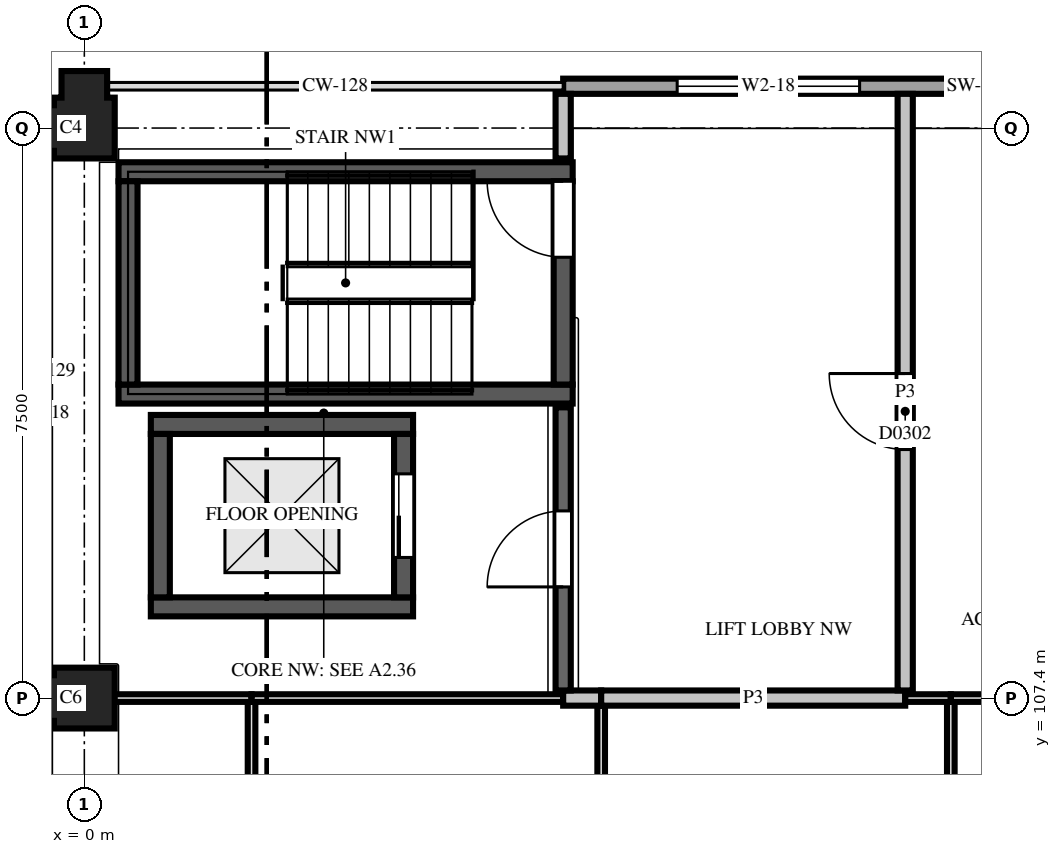
"""IFC4 building model, lengths in metres.
Left out: names, types, materials, properties, quantities, classifications, styles, units other than length and angle.
Written with IfcOpenShell. Run it as: python <this file> out.ifc"""

import sys

from ifc_helpers import new_model, si_unit, direction, frame, frame_2d, origin, place, context, subcontext, project, spatial, polyline, rectangle, outline, extrude, element, fill, save


model = new_model("IFC4")
c1 = context("Model", 3, precision=1e-05, world=origin(), true_north=direction((0.0, 1.0)))
c2 = subcontext(c1, "Body", "Model", "MODEL_VIEW")
j1 = project(units=[si_unit("LENGTHUNIT", "METRE"), si_unit("PLANEANGLEUNIT", "RADIAN")], contexts=[c1])
p1 = place(None, origin())
s1 = spatial("IfcSite", under=j1, at=p1, CompositionType="ELEMENT")
p2 = place(p1, origin())
s2 = spatial("IfcBuilding", under=s1, at=p2, CompositionType="ELEMENT")
p3 = place(p2, frame((0.0, 0.0, 11.9)))
s3 = spatial("IfcBuildingStorey", under=s2, at=p3, CompositionType="ELEMENT", Elevation=11.9)
p4 = place(p3, frame((0.0, 107.4, 0.0), z_axis=(0.0, 0.0, 1.0), x_axis=(-1.0, 0.0, 0.0)))
e1 = element("IfcColumn", 1, at=p4, inside=s3, PredefinedType="COLUMN", context=c2, shape_type="SweptSolid", body=[
    extrude(outline(polyline([(-0.4, -0.4), (0.4, -0.4), (0.4, -0.3), (0.75, -0.3), (0.75, 0.3), (0.4, 0.3), (0.4, 0.4), (-0.4, 0.4), (-0.4, -0.4)])), origin(), (0.0, 0.0, 1.0), 3.7),
])
p5 = place(p3, frame((0.0, 114.9, 0.0), z_axis=(0.0, 0.0, 1.0), x_axis=(0.0, 1.0, 0.0)))
e2 = element("IfcColumn", 2, at=p5, inside=s3, PredefinedType="COLUMN", context=c2, shape_type="SweptSolid", body=[
    extrude(outline(polyline([(-0.4, -0.4), (0.4, -0.4), (0.4, -0.3), (0.75, -0.3), (0.75, 0.3), (0.4, 0.3), (0.4, 0.4), (0.3, 0.4), (0.3, 0.75), (-0.3, 0.75), (-0.3, 0.4), (-0.4, 0.4), (-0.4, -0.4)])), origin(), (0.0, 0.0, 1.0), 3.7),
])
for number, where, z_axis, x_axis in (
    (3, (0.875, 108.6, 0.0), (0.0, 0.0, 1.0), (1.0, 0.0, 0.0)),
    (4, (0.875, 111.0, 0.0), (0.0, 0.0, 1.0), (1.0, 0.0, 0.0)),
):
    element("IfcWall", number, at=place(p3, frame(where, z_axis=z_axis, x_axis=x_axis)), inside=s3, PredefinedType="SHEAR", context=c2, shape_type="SweptSolid", body=[
        extrude(rectangle(XDim=3.45, YDim=0.25, at=frame_2d((1.725, 0.0))), origin(), (0.0, 0.0, 1.0), 3.7),
    ])
for number, where, z_axis, x_axis in (
    (5, (0.45, 111.4, 0.0), (0.0, 0.0, 1.0), (1.0, 0.0, 0.0)),
    (6, (0.45, 114.325, 0.0), (0.0, 0.0, 1.0), (1.0, 0.0, 0.0)),
):
    element("IfcWall", number, at=place(p3, frame(where, z_axis=z_axis, x_axis=x_axis)), inside=s3, PredefinedType="SHEAR", context=c2, shape_type="SweptSolid", body=[
        extrude(rectangle(XDim=5.975, YDim=0.25, at=frame_2d((2.988, 0.0))), origin(), (0.0, 0.0, 1.0), 3.7),
    ])
p6 = place(p3, frame((0.575, 111.525, 0.0), z_axis=(0.0, 0.0, 1.0), x_axis=(0.0, 1.0, 0.0)))
e7 = element("IfcWall", 7, at=p6, inside=s3, PredefinedType="SHEAR", context=c2, shape_type="SweptSolid", body=[
    extrude(rectangle(XDim=2.675, YDim=0.25, at=frame_2d((1.337, 0.0))), origin(), (0.0, 0.0, 1.0), 3.7),
])
p7 = place(p3, frame((1.0, 108.725, 0.0), z_axis=(0.0, 0.0, 1.0), x_axis=(0.0, 1.0, 0.0)))
e8 = element("IfcWall", 8, at=p7, inside=s3, PredefinedType="SHEAR", context=c2, shape_type="SweptSolid", body=[
    extrude(rectangle(XDim=2.15, YDim=0.25, at=frame_2d((1.075, 0.0))), origin(), (0.0, 0.0, 1.0), 3.7),
])
p8 = place(p3, frame((4.2, 108.725, 0.0), z_axis=(0.0, 0.0, 1.0), x_axis=(0.0, 1.0, 0.0)))
e9 = element("IfcWall", 9, at=p8, inside=s3, PredefinedType="SHEAR", context=c2, shape_type="SweptSolid", body=[
    extrude(rectangle(XDim=2.15, YDim=0.25, at=frame_2d((1.075, 0.0))), origin(), (0.0, 0.0, 1.0), 3.7),
])
p9 = place(p8, frame((0.525, 0.0, 0.0)))
e10 = element("IfcOpeningElement", 10, at=p9, cuts=e9, PredefinedType="OPENING", context=c2, shape_type="SweptSolid", body=[
    extrude(rectangle(XDim=1.1, YDim=2.1, at=frame_2d((0.55, 1.05))), frame((0.0, 0.135, 0.0), z_axis=(0.0, -1.0, 0.0), x_axis=(1.0, 0.0, 0.0)), (0.0, 0.0, 1.0), 0.27),
])
p10 = place(p3, frame((6.3, 111.525, 0.0), z_axis=(0.0, 0.0, 1.0), x_axis=(0.0, 1.0, 0.0)))
e11 = element("IfcWall", 11, at=p10, inside=s3, PredefinedType="SHEAR", context=c2, shape_type="SweptSolid", body=[
    extrude(rectangle(XDim=2.675, YDim=0.25, at=frame_2d((1.337, 0.0))), origin(), (0.0, 0.0, 1.0), 3.7),
])
p11 = place(p10, frame((1.675, 0.0, 0.0)))
e12 = element("IfcOpeningElement", 12, at=p11, cuts=e11, PredefinedType="OPENING", context=c2, shape_type="SweptSolid", body=[
    extrude(rectangle(XDim=1.0, YDim=2.1, at=frame_2d((0.5, 1.05))), frame((0.0, 0.135, 0.0), z_axis=(0.0, -1.0, 0.0), x_axis=(1.0, 0.0, 0.0)), (0.0, 0.0, 1.0), 0.27),
])
p12 = place(p3, frame((17.1, 115.45, 0.0), z_axis=(0.0, 0.0, 1.0), x_axis=(-1.0, 0.0, 0.0)))
e13 = element("IfcWall", 13, at=p12, inside=s3, PredefinedType="SOLIDWALL", context=c2, shape_type="SweptSolid", body=[
    extrude(rectangle(XDim=10.8, YDim=0.2, at=frame_2d((5.4, 0.0))), origin(), (0.0, 0.0, 1.0), 1.7),
])
p13 = place(p12, frame((1.5, 0.0, 0.55)))
e14 = element("IfcOpeningElement", 14, at=p13, cuts=e13, PredefinedType="OPENING", context=c2, shape_type="SweptSolid", body=[
    extrude(rectangle(XDim=2.4, YDim=1.0, at=frame_2d((1.2, 0.5))), frame((0.0, 0.11, 0.0), z_axis=(0.0, -1.0, 0.0), x_axis=(1.0, 0.0, 0.0)), (0.0, 0.0, 1.0), 0.22),
])
p14 = place(p12, frame((6.9, 0.0, 0.55)))
e15 = element("IfcOpeningElement", 15, at=p14, cuts=e13, PredefinedType="OPENING", context=c2, shape_type="SweptSolid", body=[
    extrude(rectangle(XDim=2.4, YDim=1.0, at=frame_2d((1.2, 0.5))), frame((0.0, 0.11, 0.0), z_axis=(0.0, -1.0, 0.0), x_axis=(1.0, 0.0, 0.0)), (0.0, 0.0, 1.0), 0.22),
])
p15 = place(p3, frame((2.2, 102.375, 0.0), z_axis=(0.0, 0.0, 1.0), x_axis=(0.0, 1.0, 0.0)))
e16 = element("IfcWall", 16, at=p15, inside=s3, PredefinedType="PARTITIONING", context=c2, shape_type="SweptSolid", body=[
    extrude(rectangle(XDim=4.975, YDim=0.1, at=frame_2d((2.488, 0.0))), origin(), (0.0, 0.0, 1.0), 2.88),
])
p16 = place(p3, frame((6.8, 102.35, 0.0), z_axis=(0.0, 0.0, 1.0), x_axis=(0.0, 1.0, 0.0)))
e17 = element("IfcWall", 17, at=p16, inside=s3, PredefinedType="PARTITIONING", context=c2, shape_type="SweptSolid", body=[
    extrude(rectangle(XDim=4.95, YDim=0.1, at=frame_2d((2.475, 0.0))), origin(), (0.0, 0.0, 1.0), 2.88),
])
p17 = place(p3, frame((11.4, 102.35, 0.0), z_axis=(0.0, 0.0, 1.0), x_axis=(0.0, 1.0, 0.0)))
e18 = element("IfcWall", 18, at=p17, inside=s3, PredefinedType="PARTITIONING", context=c2, shape_type="SweptSolid", body=[
    extrude(rectangle(XDim=5.0, YDim=0.1, at=frame_2d((2.5, 0.0))), origin(), (0.0, 0.0, 1.0), 2.88),
])
p18 = place(p3, frame((2.2, 107.4, 0.0), z_axis=(0.0, 0.0, 1.0), x_axis=(-1.0, 0.0, 0.0)))
e19 = element("IfcWall", 19, at=p18, inside=s3, PredefinedType="PARTITIONING", context=c2, shape_type="SweptSolid", body=[
    extrude(rectangle(XDim=2.14, YDim=0.1, at=frame_2d((1.07, 0.0))), origin(), (0.0, 0.0, 1.0), 2.88),
])
p19 = place(p3, frame((6.3, 107.4, 0.0), z_axis=(0.0, 0.0, 1.0), x_axis=(-1.0, 0.0, 0.0)))
e20 = element("IfcWall", 20, at=p19, inside=s3, PredefinedType="PARTITIONING", context=c2, shape_type="SweptSolid", body=[
    extrude(rectangle(XDim=4.1, YDim=0.1, at=frame_2d((2.05, 0.0))), origin(), (0.0, 0.0, 1.0), 2.88),
])
p20 = place(p3, frame((6.3, 107.4, 0.0), z_axis=(0.0, 0.0, 1.0), x_axis=(1.0, 0.0, 0.0)))
e21 = element("IfcWall", 21, at=p20, inside=s3, PredefinedType="PARTITIONING", context=c2, shape_type="SweptSolid", body=[
    extrude(rectangle(XDim=0.5, YDim=0.2, at=frame_2d((0.25, 0.0))), origin(), (0.0, 0.0, 1.0), 2.88),
])
p21 = place(p3, frame((6.8, 107.4, 0.0), z_axis=(0.0, 0.0, 1.0), x_axis=(1.0, 0.0, 0.0)))
e22 = element("IfcWall", 22, at=p21, inside=s3, PredefinedType="PARTITIONING", context=c2, shape_type="SweptSolid", body=[
    extrude(rectangle(XDim=4.0, YDim=0.2, at=frame_2d((2.0, 0.0))), origin(), (0.0, 0.0, 1.0), 2.88),
])
p22 = place(p3, frame((10.8, 107.5, 0.0), z_axis=(0.0, 0.0, 1.0), x_axis=(0.0, 1.0, 0.0)))
e23 = element("IfcWall", 23, at=p22, inside=s3, PredefinedType="PARTITIONING", context=c2, shape_type="SweptSolid", body=[
    extrude(rectangle(XDim=7.85, YDim=0.2, at=frame_2d((3.925, 0.0))), origin(), (0.0, 0.0, 1.0), 2.88),
])
p23 = place(p22, frame((3.17, 0.0, 0.0)))
e24 = element("IfcOpeningElement", 24, at=p23, cuts=e23, PredefinedType="OPENING", context=c2, shape_type="SweptSolid", body=[
    extrude(rectangle(XDim=1.0, YDim=2.1, at=frame_2d((0.5, 1.05))), frame((0.0, 0.11, 0.0), z_axis=(0.0, -1.0, 0.0), x_axis=(1.0, 0.0, 0.0)), (0.0, 0.0, 1.0), 0.22),
])
p24 = place(p3, frame((11.4, 107.4, 0.0), z_axis=(0.0, 0.0, 1.0), x_axis=(-1.0, 0.0, 0.0)))
e25 = element("IfcWall", 25, at=p24, inside=s3, PredefinedType="PARTITIONING", context=c2, shape_type="SweptSolid", body=[
    extrude(rectangle(XDim=0.6, YDim=0.1, at=frame_2d((0.3, 0.0))), origin(), (0.0, 0.0, 1.0), 2.88),
])
p25 = place(p3, frame((14.45, 107.4, 0.0), z_axis=(0.0, 0.0, 1.0), x_axis=(-1.0, 0.0, 0.0)))
e26 = element("IfcWall", 26, at=p25, inside=s3, PredefinedType="PARTITIONING", context=c2, shape_type="SweptSolid", body=[
    extrude(rectangle(XDim=3.05, YDim=0.1, at=frame_2d((1.525, 0.0))), origin(), (0.0, 0.0, 1.0), 2.88),
])
p26 = place(p3, frame((6.3, 111.225, 0.0), z_axis=(0.0, 0.0, 1.0), x_axis=(0.0, -1.0, 0.0)))
e27 = element("IfcWall", 27, at=p26, inside=s3, PredefinedType="PARTITIONING", context=c2, shape_type="SweptSolid", body=[
    extrude(rectangle(XDim=3.725, YDim=0.2, at=frame_2d((1.863, 0.0))), origin(), (0.0, 0.0, 1.0), 2.88),
])
p27 = place(p26, frame((1.363, 0.0, 0.0)))
e28 = element("IfcOpeningElement", 28, at=p27, cuts=e27, PredefinedType="OPENING", context=c2, shape_type="SweptSolid", body=[
    extrude(rectangle(XDim=1.0, YDim=2.1, at=frame_2d((0.5, 1.05))), frame((0.0, 0.11, 0.0), z_axis=(0.0, -1.0, 0.0), x_axis=(1.0, 0.0, 0.0)), (0.0, 0.0, 1.0), 0.22),
])
p28 = place(p3, frame((6.3, 115.35, 0.0), z_axis=(0.0, 0.0, 1.0), x_axis=(0.0, -1.0, 0.0)))
e29 = element("IfcWall", 29, at=p28, inside=s3, PredefinedType="PARTITIONING", context=c2, shape_type="SweptSolid", body=[
    extrude(rectangle(XDim=0.85, YDim=0.2, at=frame_2d((0.425, 0.0))), origin(), (0.0, 0.0, 1.0), 2.88),
])
p29 = place(p14, origin())
e30 = element("IfcWindow", 30, at=p29, inside=s3, PartitioningType="SINGLE_PANEL", PredefinedType="WINDOW", context=c2, shape_type="SweptSolid", body=[
    extrude(rectangle(XDim=2.4, YDim=1.0, at=frame_2d((1.2, 0.5))), frame((0.0, 0.03, 0.0), z_axis=(0.0, -1.0, 0.0), x_axis=(1.0, 0.0, 0.0)), (0.0, 0.0, 1.0), 0.06),
])
fill(e15, e30)
p30 = place(p23, origin())
e31 = element("IfcDoor", 31, at=p30, inside=s3, OperationType="SINGLE_SWING_LEFT", PredefinedType="DOOR", context=c2, shape_type="SweptSolid", body=[
    extrude(rectangle(XDim=1.0, YDim=2.1, at=frame_2d((0.5, 1.05))), frame((0.0, 0.025, 0.0), z_axis=(0.0, -1.0, 0.0), x_axis=(1.0, 0.0, 0.0)), (0.0, 0.0, 1.0), 0.05),
])
fill(e24, e31)
p31 = place(p9, origin())
e32 = element("IfcDoor", 32, at=p31, inside=s3, OperationType="SLIDING_TO_LEFT", PredefinedType="DOOR", context=c2, shape_type="SweptSolid", body=[
    extrude(rectangle(XDim=1.1, YDim=2.1, at=frame_2d((0.55, 1.05))), frame((0.0, 0.025, 0.0), z_axis=(0.0, -1.0, 0.0), x_axis=(1.0, 0.0, 0.0)), (0.0, 0.0, 1.0), 0.05),
])
fill(e10, e32)
p32 = place(p11, origin())
e33 = element("IfcDoor", 33, at=p32, inside=s3, OperationType="SINGLE_SWING_LEFT", PredefinedType="DOOR", context=c2, shape_type="SweptSolid", body=[
    extrude(rectangle(XDim=1.0, YDim=2.1, at=frame_2d((0.5, 1.05))), frame((0.0, 0.025, 0.0), z_axis=(0.0, -1.0, 0.0), x_axis=(1.0, 0.0, 0.0)), (0.0, 0.0, 1.0), 0.05),
])
fill(e12, e33)
p33 = place(p27, origin())
e34 = element("IfcDoor", 34, at=p33, inside=s3, OperationType="SINGLE_SWING_RIGHT", PredefinedType="DOOR", context=c2, shape_type="SweptSolid", body=[
    extrude(rectangle(XDim=1.0, YDim=2.1, at=frame_2d((0.5, 1.05))), frame((0.0, 0.025, 0.0), z_axis=(0.0, -1.0, 0.0), x_axis=(1.0, 0.0, 0.0)), (0.0, 0.0, 1.0), 0.05),
])
fill(e28, e34)
save(model, sys.argv[1])
